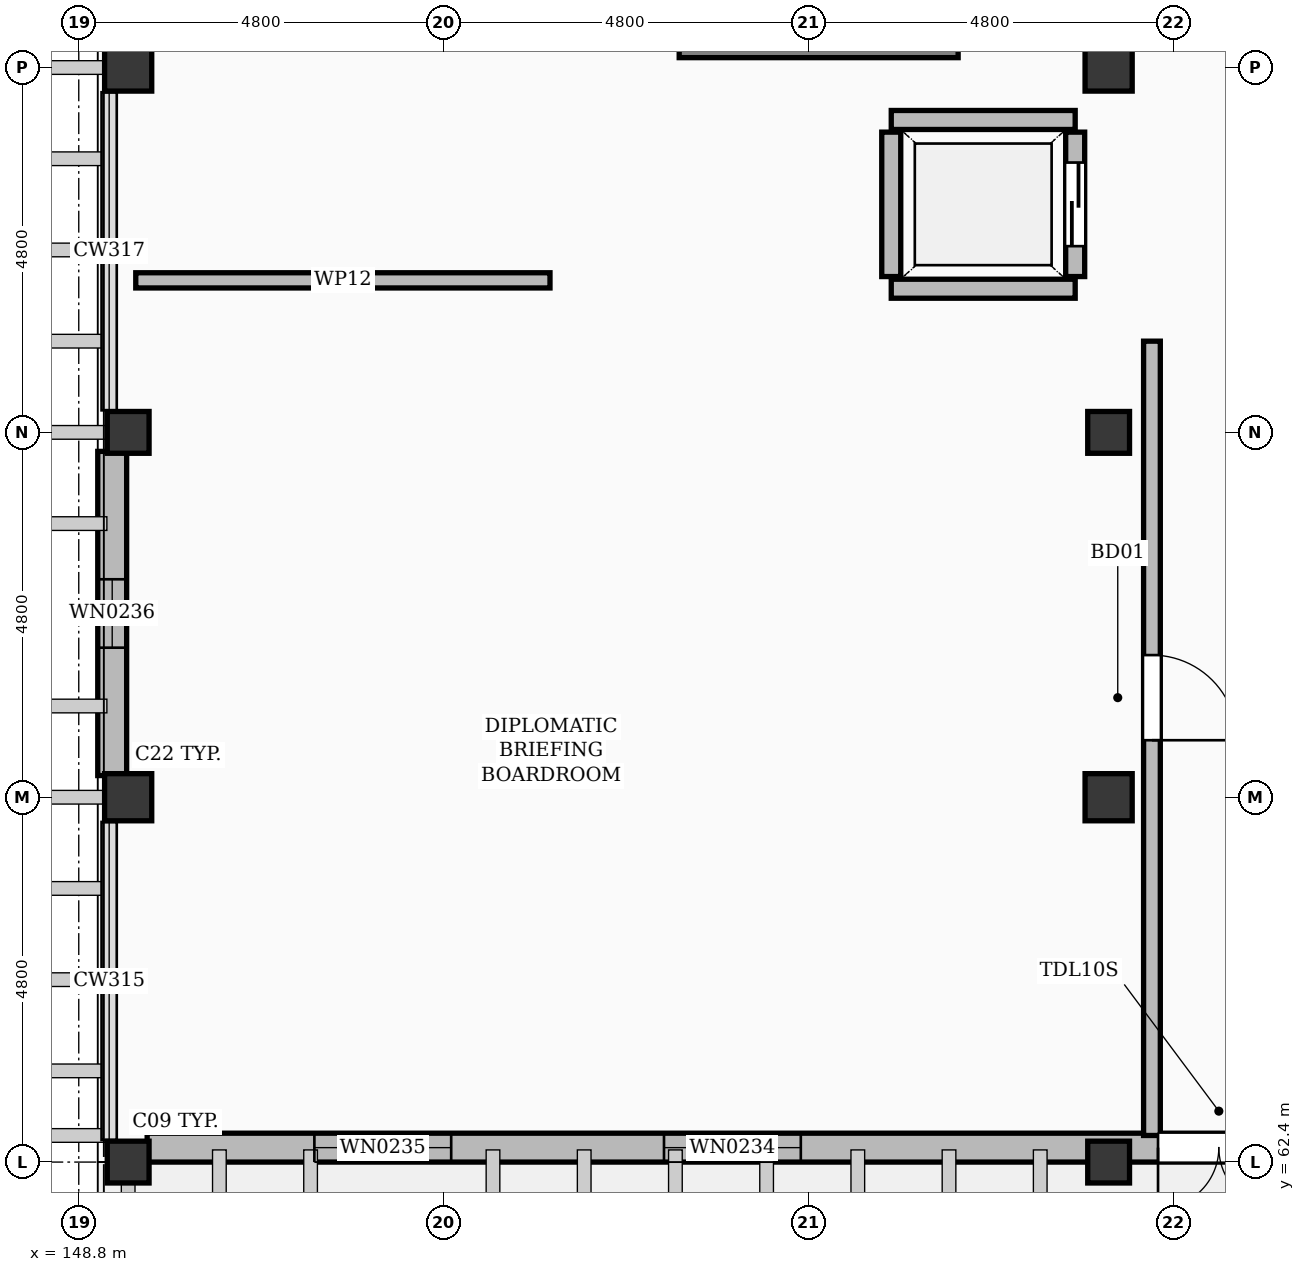
"""IFC4 building model, lengths in metres.
Left out: names, types, materials, properties, quantities, classifications, styles, units other than length and angle.
Written with IfcOpenShell. Run it as: python <this file> out.ifc"""

import sys

from ifc_helpers import new_model, si_unit, direction, frame, frame_2d, origin, origin_2d, place, context, subcontext, project, spatial, rectangle, extrude, element, fill, save


model = new_model("IFC4")
c1 = context("Model", 3, precision=1e-05, world=origin(), true_north=direction((0.0, 1.0)))
c2 = subcontext(c1, "Body", "Model", "MODEL_VIEW")
j1 = project(units=[si_unit("LENGTHUNIT", "METRE"), si_unit("PLANEANGLEUNIT", "RADIAN")], contexts=[c1])
p1 = place(None, origin())
s1 = spatial("IfcSite", under=j1, at=p1, CompositionType="ELEMENT")
p2 = place(p1, origin())
s2 = spatial("IfcBuilding", under=s1, at=p2, CompositionType="ELEMENT")
p3 = place(p2, frame((0.0, 0.0, 42.6)))
s3 = spatial("IfcBuildingStorey", under=s2, at=p3, CompositionType="ELEMENT", Elevation=42.6)
for number, where, z_axis, x_axis in (
    (1, (149.45, 67.2, 0.0), (0.0, 0.0, 1.0), (1.0, 0.0, 0.0)),
    (2, (149.45, 76.8, 0.0), (0.0, 0.0, 1.0), (1.0, 0.0, 0.0)),
    (3, (162.35, 67.2, 0.0), (0.0, 0.0, 1.0), (1.0, 0.0, 0.0)),
    (4, (162.35, 76.8, 0.0), (0.0, 0.0, 1.0), (1.0, 0.0, 0.0)),
):
    element("IfcColumn", number, at=place(p3, frame(where, z_axis=z_axis, x_axis=x_axis)), inside=s3, PredefinedType="COLUMN", context=c2, shape_type="SweptSolid", body=[
        extrude(rectangle(XDim=0.62, YDim=0.62, at=origin_2d()), origin(), (0.0, 0.0, 1.0), 3.9),
    ])
for number, where, z_axis, x_axis in (
    (5, (149.45, 62.4, 0.0), (0.0, 0.0, 1.0), (1.0, 0.0, 0.0)),
    (6, (149.45, 72.0, 0.0), (0.0, 0.0, 1.0), (1.0, 0.0, 0.0)),
    (7, (162.35, 62.4, 0.0), (0.0, 0.0, 1.0), (1.0, 0.0, 0.0)),
    (8, (162.35, 72.0, 0.0), (0.0, 0.0, 1.0), (1.0, 0.0, 0.0)),
):
    element("IfcColumn", number, at=place(p3, frame(where, z_axis=z_axis, x_axis=x_axis)), inside=s3, PredefinedType="COLUMN", context=c2, shape_type="SweptSolid", body=[
        extrude(rectangle(XDim=0.55, YDim=0.55, at=origin_2d()), origin(), (0.0, 0.0, 1.0), 3.9),
    ])
p4 = place(p3, frame((179.1, 62.59, 0.0), z_axis=(0.0, 0.0, 1.0), x_axis=(-1.0, 0.0, 0.0)))
e9 = element("IfcWall", 9, at=p4, inside=s3, PredefinedType="SOLIDWALL", context=c2, shape_type="SweptSolid", body=[
    extrude(rectangle(XDim=29.4, YDim=0.38, at=frame_2d((14.7, 0.0))), origin(), (0.0, 0.0, 1.0), 2.902),
])
p5 = place(p4, frame((14.5, 0.0, 0.0)))
e10 = element("IfcOpeningElement", 10, at=p5, cuts=e9, PredefinedType="OPENING", context=c2, shape_type="SweptSolid", body=[
    extrude(rectangle(XDim=1.6, YDim=2.25, at=frame_2d((0.8, 1.125))), frame((0.0, 0.202, 0.0), z_axis=(0.0, -1.0, 0.0), x_axis=(1.0, 0.0, 0.0)), (0.0, 0.0, 1.0), 0.404),
])
p6 = place(p4, frame((4.0, 0.0, 0.55)))
e11 = element("IfcOpeningElement", 11, at=p6, cuts=e9, PredefinedType="OPENING", context=c2, shape_type="SweptSolid", body=[
    extrude(rectangle(XDim=1.8, YDim=1.76, at=frame_2d((0.9, 0.88))), frame((0.0, 0.202, 0.0), z_axis=(0.0, -1.0, 0.0), x_axis=(1.0, 0.0, 0.0)), (0.0, 0.0, 1.0), 0.404),
])
p7 = place(p4, frame((9.6, 0.0, 0.55)))
e12 = element("IfcOpeningElement", 12, at=p7, cuts=e9, PredefinedType="OPENING", context=c2, shape_type="SweptSolid", body=[
    extrude(rectangle(XDim=1.8, YDim=1.76, at=frame_2d((0.9, 0.88))), frame((0.0, 0.202, 0.0), z_axis=(0.0, -1.0, 0.0), x_axis=(1.0, 0.0, 0.0)), (0.0, 0.0, 1.0), 0.404),
])
p8 = place(p4, frame((20.8, 0.0, 0.55)))
e13 = element("IfcOpeningElement", 13, at=p8, cuts=e9, PredefinedType="OPENING", context=c2, shape_type="SweptSolid", body=[
    extrude(rectangle(XDim=1.8, YDim=1.76, at=frame_2d((0.9, 0.88))), frame((0.0, 0.202, 0.0), z_axis=(0.0, -1.0, 0.0), x_axis=(1.0, 0.0, 0.0)), (0.0, 0.0, 1.0), 0.404),
])
p9 = place(p4, frame((25.4, 0.0, 0.55)))
e14 = element("IfcOpeningElement", 14, at=p9, cuts=e9, PredefinedType="OPENING", context=c2, shape_type="SweptSolid", body=[
    extrude(rectangle(XDim=1.8, YDim=1.76, at=frame_2d((0.9, 0.88))), frame((0.0, 0.202, 0.0), z_axis=(0.0, -1.0, 0.0), x_axis=(1.0, 0.0, 0.0)), (0.0, 0.0, 1.0), 0.404),
])
p10 = place(p3, frame((149.24, 67.485, 0.0), z_axis=(0.0, 0.0, 1.0), x_axis=(0.0, 1.0, 0.0)))
e15 = element("IfcWall", 15, at=p10, inside=s3, PredefinedType="SOLIDWALL", context=c2, shape_type="SweptSolid", body=[
    extrude(rectangle(XDim=4.265, YDim=0.38, at=frame_2d((2.132, 0.0))), origin(), (0.0, 0.0, 1.0), 3.072),
])
p11 = place(p10, frame((1.683, 0.0, 0.55)))
e16 = element("IfcOpeningElement", 16, at=p11, cuts=e15, PredefinedType="OPENING", context=c2, shape_type="SweptSolid", body=[
    extrude(rectangle(XDim=0.9, YDim=1.68, at=frame_2d((0.45, 0.84))), frame((0.0, 0.202, 0.0), z_axis=(0.0, -1.0, 0.0), x_axis=(1.0, 0.0, 0.0)), (0.0, 0.0, 1.0), 0.404),
])
p12 = place(p3, frame((156.7, 77.18, 0.0), z_axis=(0.0, 0.0, 1.0), x_axis=(1.0, 0.0, 0.0)))
e17 = element("IfcWall", 17, at=p12, inside=s3, PredefinedType="SHEAR", context=c2, shape_type="SweptSolid", body=[
    extrude(rectangle(XDim=3.67, YDim=0.5, at=frame_2d((1.835, 0.0))), origin(), (0.0, 0.0, 1.0), 3.66),
])
for number, where, z_axis, x_axis in (
    (18, (159.49, 73.89, 0.0), (0.0, 0.0, 1.0), (1.0, 0.0, 0.0)),
    (19, (159.49, 76.11, 0.0), (0.0, 0.0, 1.0), (1.0, 0.0, 0.0)),
):
    element("IfcWall", number, at=place(p3, frame(where, z_axis=z_axis, x_axis=x_axis)), inside=s3, PredefinedType="SOLIDWALL", context=c2, shape_type="SweptSolid", body=[
        extrude(rectangle(XDim=2.42, YDim=0.25, at=frame_2d((1.21, 0.0))), origin(), (0.0, 0.0, 1.0), 3.66),
    ])
p13 = place(p3, frame((159.49, 74.05, 0.0), z_axis=(0.0, 0.0, 1.0), x_axis=(0.0, 1.0, 0.0)))
e20 = element("IfcWall", 20, at=p13, inside=s3, PredefinedType="SOLIDWALL", context=c2, shape_type="SweptSolid", body=[
    extrude(rectangle(XDim=1.9, YDim=0.25, at=frame_2d((0.95, 0.0))), origin(), (0.0, 0.0, 1.0), 3.66),
])
p14 = place(p3, frame((161.91, 74.05, 0.0), z_axis=(0.0, 0.0, 1.0), x_axis=(0.0, 1.0, 0.0)))
e21 = element("IfcWall", 21, at=p14, inside=s3, PredefinedType="SOLIDWALL", context=c2, shape_type="SweptSolid", body=[
    extrude(rectangle(XDim=1.9, YDim=0.25, at=frame_2d((0.95, 0.0))), origin(), (0.0, 0.0, 1.0), 3.66),
])
p15 = place(p14, frame((0.4, 0.0, 0.0)))
e22 = element("IfcOpeningElement", 22, at=p15, cuts=e21, PredefinedType="OPENING", context=c2, shape_type="SweptSolid", body=[
    extrude(rectangle(XDim=1.1, YDim=2.2, at=frame_2d((0.55, 1.1))), frame((0.0, 0.137, 0.0), z_axis=(0.0, -1.0, 0.0), x_axis=(1.0, 0.0, 0.0)), (0.0, 0.0, 1.0), 0.274),
])
p16 = place(p3, frame((162.92, 62.75, 0.0), z_axis=(0.0, 0.0, 1.0), x_axis=(0.0, 1.0, 0.0)))
e23 = element("IfcWall", 23, at=p16, inside=s3, PredefinedType="PARTITIONING", context=c2, shape_type="SweptSolid", body=[
    extrude(rectangle(XDim=10.45, YDim=0.22, at=frame_2d((5.225, 0.0))), origin(), (0.0, 0.0, 1.0), 3.072),
])
p17 = place(p16, frame((5.2, 0.0, 0.0)))
e24 = element("IfcOpeningElement", 24, at=p17, cuts=e23, PredefinedType="OPENING", context=c2, shape_type="SweptSolid", body=[
    extrude(rectangle(XDim=1.12, YDim=2.15, at=frame_2d((0.56, 1.075))), frame((0.0, 0.122, 0.0), z_axis=(0.0, -1.0, 0.0), x_axis=(1.0, 0.0, 0.0)), (0.0, 0.0, 1.0), 0.244),
])
p18 = place(p3, frame((149.55, 74.0, 0.0), z_axis=(0.0, 0.0, 1.0), x_axis=(1.0, 0.0, 0.0)))
e25 = element("IfcWall", 25, at=p18, inside=s3, PredefinedType="PARTITIONING", context=c2, shape_type="SweptSolid", body=[
    extrude(rectangle(XDim=5.45, YDim=0.2, at=frame_2d((2.725, 0.0))), origin(), (0.0, 0.0, 1.0), 3.072),
])
p19 = place(p5, origin())
e26 = element("IfcDoor", 26, at=p19, inside=s3, OperationType="DOUBLE_DOOR_SINGLE_SWING", PredefinedType="DOOR", context=c2, shape_type="SweptSolid", body=[
    extrude(rectangle(XDim=1.6, YDim=2.25, at=frame_2d((0.8, 1.125))), frame((0.0, 0.025, 0.0), z_axis=(0.0, -1.0, 0.0), x_axis=(1.0, 0.0, 0.0)), (0.0, 0.0, 1.0), 0.05),
])
fill(e10, e26)
p20 = place(p8, origin())
e27 = element("IfcWindow", 27, at=p20, inside=s3, PartitioningType="SINGLE_PANEL", PredefinedType="WINDOW", context=c2, shape_type="SweptSolid", body=[
    extrude(rectangle(XDim=1.8, YDim=1.76, at=frame_2d((0.9, 0.88))), frame((0.0, 0.03, 0.0), z_axis=(0.0, -1.0, 0.0), x_axis=(1.0, 0.0, 0.0)), (0.0, 0.0, 1.0), 0.06),
])
fill(e13, e27)
p21 = place(p9, origin())
e28 = element("IfcWindow", 28, at=p21, inside=s3, PartitioningType="SINGLE_PANEL", PredefinedType="WINDOW", context=c2, shape_type="SweptSolid", body=[
    extrude(rectangle(XDim=1.8, YDim=1.76, at=frame_2d((0.9, 0.88))), frame((0.0, 0.03, 0.0), z_axis=(0.0, -1.0, 0.0), x_axis=(1.0, 0.0, 0.0)), (0.0, 0.0, 1.0), 0.06),
])
fill(e14, e28)
p22 = place(p11, origin())
e29 = element("IfcWindow", 29, at=p22, inside=s3, PartitioningType="SINGLE_PANEL", PredefinedType="WINDOW", context=c2, shape_type="SweptSolid", body=[
    extrude(rectangle(XDim=0.9, YDim=1.68, at=frame_2d((0.45, 0.84))), frame((0.0, 0.03, 0.0), z_axis=(0.0, -1.0, 0.0), x_axis=(1.0, 0.0, 0.0)), (0.0, 0.0, 1.0), 0.06),
])
fill(e16, e29)
p23 = place(p15, origin())
e30 = element("IfcDoor", 30, at=p23, inside=s3, OperationType="SLIDING_TO_LEFT", PredefinedType="DOOR", context=c2, shape_type="SweptSolid", body=[
    extrude(rectangle(XDim=1.1, YDim=2.2, at=frame_2d((0.55, 1.1))), frame((0.0, 0.025, 0.0), z_axis=(0.0, -1.0, 0.0), x_axis=(1.0, 0.0, 0.0)), (0.0, 0.0, 1.0), 0.05),
])
fill(e22, e30)
p24 = place(p17, frame((1.12, 0.0, 0.0), z_axis=(0.0, 0.0, 1.0), x_axis=(-1.0, 0.0, 0.0)))
e31 = element("IfcDoor", 31, at=p24, inside=s3, OperationType="SINGLE_SWING_LEFT", PredefinedType="DOOR", context=c2, shape_type="SweptSolid", body=[
    extrude(rectangle(XDim=1.12, YDim=2.15, at=frame_2d((0.56, 1.075))), frame((0.0, 0.025, 0.0), z_axis=(0.0, -1.0, 0.0), x_axis=(1.0, 0.0, 0.0)), (0.0, 0.0, 1.0), 0.05),
])
fill(e24, e31)
save(model, sys.argv[1])
